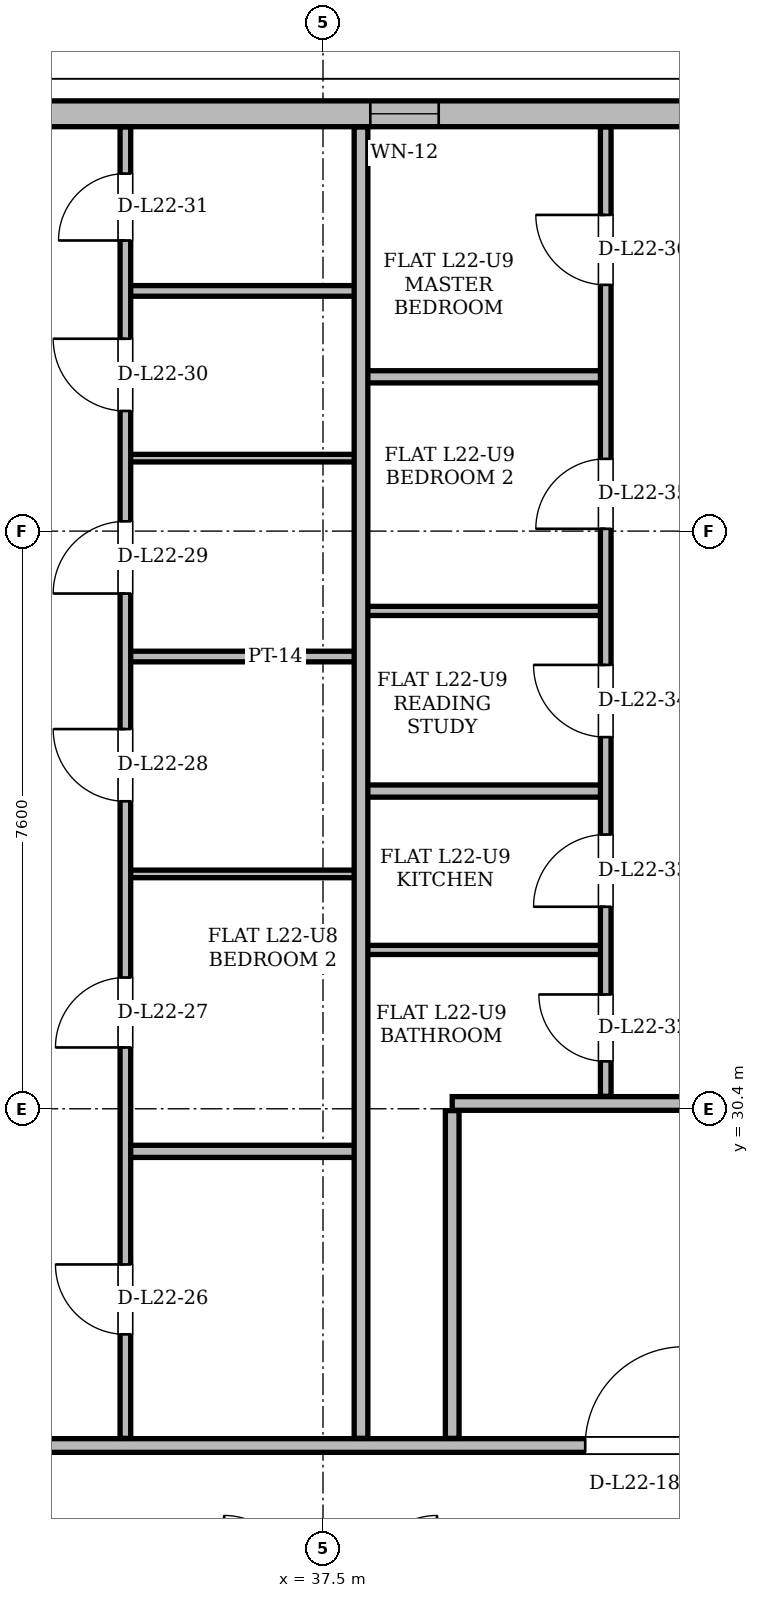
"""IFC4 building model, lengths in metres.
Left out: names, types, materials, properties, quantities, classifications, styles, units other than length and angle.
Written with IfcOpenShell. Run it as: python <this file> out.ifc"""

import sys

from ifc_helpers import new_model, si_unit, direction, frame, frame_2d, origin, place, context, subcontext, project, spatial, rectangle, extrude, element, fill, save


model = new_model("IFC4")
c1 = context("Model", 3, precision=1e-05, world=origin(), true_north=direction((0.0, 1.0)))
c2 = subcontext(c1, "Body", "Model", "MODEL_VIEW")
j1 = project(units=[si_unit("LENGTHUNIT", "METRE"), si_unit("PLANEANGLEUNIT", "RADIAN")], contexts=[c1])
p1 = place(None, origin())
s1 = spatial("IfcSite", under=j1, at=p1, CompositionType="ELEMENT")
p2 = place(p1, origin())
s2 = spatial("IfcBuilding", under=s1, at=p2, CompositionType="ELEMENT")
p3 = place(p2, frame((0.0, 0.0, 86.1)))
s3 = spatial("IfcBuildingStorey", under=s2, at=p3, CompositionType="ELEMENT", Elevation=86.1)
p4 = place(p3, frame((43.821, 43.49, 0.0), z_axis=(0.0, 0.0, 1.0), x_axis=(-1.0, 0.0, 0.0)))
e1 = element("IfcWall", 1, at=p4, inside=s3, PredefinedType="SOLIDWALL", context=c2, shape_type="SweptSolid", body=[
    extrude(rectangle(XDim=12.643, YDim=0.34, at=frame_2d((6.321, 0.0))), origin(), (0.0, 0.0, 1.0), 2.578),
])
p5 = place(p4, frame((4.799, 0.0, 0.85)))
e2 = element("IfcOpeningElement", 2, at=p5, cuts=e1, PredefinedType="OPENING", context=c2, shape_type="SweptSolid", body=[
    extrude(rectangle(XDim=0.9, YDim=1.15, at=frame_2d((0.45, 0.575))), frame((0.0, 0.17, 0.0), z_axis=(0.0, -1.0, 0.0), x_axis=(1.0, 0.0, 0.0)), (0.0, 0.0, 1.0), 0.34),
])
p6 = place(p3, frame((27.55, 25.97, 0.0), z_axis=(0.0, 0.0, 1.0), x_axis=(1.0, 0.0, 0.0)))
e3 = element("IfcWall", 3, at=p6, inside=s3, PredefinedType="PARTITIONING", context=c2, shape_type="SweptSolid", body=[
    extrude(rectangle(XDim=19.9, YDim=0.18, at=frame_2d((9.95, 0.0))), origin(), (0.0, 0.0, 1.0), 2.814),
])
p7 = place(p6, frame((0.425, 0.0, 0.0)))
e4 = element("IfcOpeningElement", 4, at=p7, cuts=e3, PredefinedType="OPENING", context=c2, shape_type="SweptSolid", body=[
    extrude(rectangle(XDim=1.0, YDim=2.18, at=frame_2d((0.5, 1.09))), frame((0.0, 0.09, 0.0), z_axis=(0.0, -1.0, 0.0), x_axis=(1.0, 0.0, 0.0)), (0.0, 0.0, 1.0), 0.18),
])
p8 = place(p6, frame((4.222, 0.0, 0.0)))
e5 = element("IfcOpeningElement", 5, at=p8, cuts=e3, PredefinedType="OPENING", context=c2, shape_type="SweptSolid", body=[
    extrude(rectangle(XDim=1.0, YDim=2.18, at=frame_2d((0.5, 1.09))), frame((0.0, 0.09, 0.0), z_axis=(0.0, -1.0, 0.0), x_axis=(1.0, 0.0, 0.0)), (0.0, 0.0, 1.0), 0.18),
])
p9 = place(p6, frame((13.4, 0.0, 0.0)))
e6 = element("IfcOpeningElement", 6, at=p9, cuts=e3, PredefinedType="OPENING", context=c2, shape_type="SweptSolid", body=[
    extrude(rectangle(XDim=1.3, YDim=2.2, at=frame_2d((0.65, 1.1))), frame((0.0, 0.09, 0.0), z_axis=(0.0, -1.0, 0.0), x_axis=(1.0, 0.0, 0.0)), (0.0, 0.0, 1.0), 0.18),
])
p10 = place(p6, frame((16.95, 0.0, 0.0)))
e7 = element("IfcOpeningElement", 7, at=p10, cuts=e3, PredefinedType="OPENING", context=c2, shape_type="SweptSolid", body=[
    extrude(rectangle(XDim=1.0, YDim=2.18, at=frame_2d((0.5, 1.09))), frame((0.0, 0.09, 0.0), z_axis=(0.0, -1.0, 0.0), x_axis=(1.0, 0.0, 0.0)), (0.0, 0.0, 1.0), 0.18),
])
p11 = place(p3, frame((34.9, 29.84, 0.0), z_axis=(0.0, 0.0, 1.0), x_axis=(1.0, 0.0, 0.0)))
e8 = element("IfcWall", 8, at=p11, inside=s3, PredefinedType="PARTITIONING", context=c2, shape_type="SweptSolid", body=[
    extrude(rectangle(XDim=3.15, YDim=0.16, at=frame_2d((1.575, 0.0))), origin(), (0.0, 0.0, 1.0), 3.36),
])
p12 = place(p3, frame((39.2, 30.47, 0.0), z_axis=(0.0, 0.0, 1.0), x_axis=(1.0, 0.0, 0.0)))
e9 = element("IfcWall", 9, at=p12, inside=s3, PredefinedType="PARTITIONING", context=c2, shape_type="SweptSolid", body=[
    extrude(rectangle(XDim=4.8, YDim=0.18, at=frame_2d((2.4, 0.0))), origin(), (0.0, 0.0, 1.0), 3.36),
])
p13 = place(p3, frame((37.95, 32.49, 0.0), z_axis=(0.0, 0.0, 1.0), x_axis=(1.0, 0.0, 0.0)))
e10 = element("IfcWall", 10, at=p13, inside=s3, PredefinedType="PARTITIONING", context=c2, shape_type="SweptSolid", body=[
    extrude(rectangle(XDim=3.27, YDim=0.12, at=frame_2d((1.635, 0.0))), origin(), (0.0, 0.0, 1.0), 3.36),
])
p14 = place(p3, frame((34.9, 33.49, 0.0), z_axis=(0.0, 0.0, 1.0), x_axis=(1.0, 0.0, 0.0)))
e11 = element("IfcWall", 11, at=p14, inside=s3, PredefinedType="PARTITIONING", context=c2, shape_type="SweptSolid", body=[
    extrude(rectangle(XDim=3.15, YDim=0.1, at=frame_2d((1.575, 0.0))), origin(), (0.0, 0.0, 1.0), 3.36),
])
p15 = place(p3, frame((37.95, 34.58, 0.0), z_axis=(0.0, 0.0, 1.0), x_axis=(1.0, 0.0, 0.0)))
e12 = element("IfcWall", 12, at=p15, inside=s3, PredefinedType="PARTITIONING", context=c2, shape_type="SweptSolid", body=[
    extrude(rectangle(XDim=3.27, YDim=0.16, at=frame_2d((1.635, 0.0))), origin(), (0.0, 0.0, 1.0), 3.36),
])
p16 = place(p3, frame((34.9, 36.35, 0.0), z_axis=(0.0, 0.0, 1.0), x_axis=(1.0, 0.0, 0.0)))
e13 = element("IfcWall", 13, at=p16, inside=s3, PredefinedType="PARTITIONING", context=c2, shape_type="SweptSolid", body=[
    extrude(rectangle(XDim=3.15, YDim=0.14, at=frame_2d((1.575, 0.0))), origin(), (0.0, 0.0, 1.0), 3.36),
])
p17 = place(p3, frame((37.95, 36.95, 0.0), z_axis=(0.0, 0.0, 1.0), x_axis=(1.0, 0.0, 0.0)))
e14 = element("IfcWall", 14, at=p17, inside=s3, PredefinedType="PARTITIONING", context=c2, shape_type="SweptSolid", body=[
    extrude(rectangle(XDim=3.27, YDim=0.12, at=frame_2d((1.635, 0.0))), origin(), (0.0, 0.0, 1.0), 3.36),
])
p18 = place(p3, frame((34.9, 38.96, 0.0), z_axis=(0.0, 0.0, 1.0), x_axis=(1.0, 0.0, 0.0)))
e15 = element("IfcWall", 15, at=p18, inside=s3, PredefinedType="PARTITIONING", context=c2, shape_type="SweptSolid", body=[
    extrude(rectangle(XDim=3.15, YDim=0.1, at=frame_2d((1.575, 0.0))), origin(), (0.0, 0.0, 1.0), 3.36),
])
p19 = place(p3, frame((37.95, 40.03, 0.0), z_axis=(0.0, 0.0, 1.0), x_axis=(1.0, 0.0, 0.0)))
e16 = element("IfcWall", 16, at=p19, inside=s3, PredefinedType="PARTITIONING", context=c2, shape_type="SweptSolid", body=[
    extrude(rectangle(XDim=3.27, YDim=0.16, at=frame_2d((1.635, 0.0))), origin(), (0.0, 0.0, 1.0), 3.36),
])
p20 = place(p3, frame((34.9, 41.16, 0.0), z_axis=(0.0, 0.0, 1.0), x_axis=(1.0, 0.0, 0.0)))
e17 = element("IfcWall", 17, at=p20, inside=s3, PredefinedType="PARTITIONING", context=c2, shape_type="SweptSolid", body=[
    extrude(rectangle(XDim=3.15, YDim=0.14, at=frame_2d((1.575, 0.0))), origin(), (0.0, 0.0, 1.0), 3.36),
])
p21 = place(p3, frame((34.9, 26.064, 0.0), z_axis=(0.0, 0.0, 1.0), x_axis=(0.0, 1.0, 0.0)))
e18 = element("IfcWall", 18, at=p21, inside=s3, PredefinedType="PARTITIONING", context=c2, shape_type="SweptSolid", body=[
    extrude(rectangle(XDim=17.252, YDim=0.14, at=frame_2d((8.626, 0.0))), origin(), (0.0, 0.0, 1.0), 3.36),
])
p22 = place(p21, frame((1.368, 0.0, 0.0)))
e19 = element("IfcOpeningElement", 19, at=p22, cuts=e18, PredefinedType="OPENING", context=c2, shape_type="SweptSolid", body=[
    extrude(rectangle(XDim=0.92, YDim=2.12, at=frame_2d((0.46, 1.06))), frame((0.0, 0.07, 0.0), z_axis=(0.0, -1.0, 0.0), x_axis=(1.0, 0.0, 0.0)), (0.0, 0.0, 1.0), 0.14),
])
p23 = place(p21, frame((5.143, 0.0, 0.0)))
e20 = element("IfcOpeningElement", 20, at=p23, cuts=e18, PredefinedType="OPENING", context=c2, shape_type="SweptSolid", body=[
    extrude(rectangle(XDim=0.92, YDim=2.12, at=frame_2d((0.46, 1.06))), frame((0.0, 0.07, 0.0), z_axis=(0.0, -1.0, 0.0), x_axis=(1.0, 0.0, 0.0)), (0.0, 0.0, 1.0), 0.14),
])
p24 = place(p21, frame((8.382, 0.0, 0.0)))
e21 = element("IfcOpeningElement", 21, at=p24, cuts=e18, PredefinedType="OPENING", context=c2, shape_type="SweptSolid", body=[
    extrude(rectangle(XDim=0.95, YDim=2.1, at=frame_2d((0.475, 1.05))), frame((0.0, 0.07, 0.0), z_axis=(0.0, -1.0, 0.0), x_axis=(1.0, 0.0, 0.0)), (0.0, 0.0, 1.0), 0.14),
])
p25 = place(p21, frame((11.115, 0.0, 0.0)))
e22 = element("IfcOpeningElement", 22, at=p25, cuts=e18, PredefinedType="OPENING", context=c2, shape_type="SweptSolid", body=[
    extrude(rectangle(XDim=0.95, YDim=2.1, at=frame_2d((0.475, 1.05))), frame((0.0, 0.07, 0.0), z_axis=(0.0, -1.0, 0.0), x_axis=(1.0, 0.0, 0.0)), (0.0, 0.0, 1.0), 0.14),
])
p26 = place(p21, frame((13.517, 0.0, 0.0)))
e23 = element("IfcOpeningElement", 23, at=p26, cuts=e18, PredefinedType="OPENING", context=c2, shape_type="SweptSolid", body=[
    extrude(rectangle(XDim=0.95, YDim=2.1, at=frame_2d((0.475, 1.05))), frame((0.0, 0.07, 0.0), z_axis=(0.0, -1.0, 0.0), x_axis=(1.0, 0.0, 0.0)), (0.0, 0.0, 1.0), 0.14),
])
p27 = place(p21, frame((15.76, 0.0, 0.0)))
e24 = element("IfcOpeningElement", 24, at=p27, cuts=e18, PredefinedType="OPENING", context=c2, shape_type="SweptSolid", body=[
    extrude(rectangle(XDim=0.88, YDim=2.08, at=frame_2d((0.44, 1.04))), frame((0.0, 0.07, 0.0), z_axis=(0.0, -1.0, 0.0), x_axis=(1.0, 0.0, 0.0)), (0.0, 0.0, 1.0), 0.14),
])
p28 = place(p3, frame((38.0, 26.064, 0.0), z_axis=(0.0, 0.0, 1.0), x_axis=(0.0, 1.0, 0.0)))
e25 = element("IfcWall", 25, at=p28, inside=s3, PredefinedType="PARTITIONING", context=c2, shape_type="SweptSolid", body=[
    extrude(rectangle(XDim=17.252, YDim=0.18, at=frame_2d((8.626, 0.0))), origin(), (0.0, 0.0, 1.0), 3.36),
])
p29 = place(p3, frame((39.2, 26.064, 0.0), z_axis=(0.0, 0.0, 1.0), x_axis=(0.0, 1.0, 0.0)))
e26 = element("IfcWall", 26, at=p29, inside=s3, PredefinedType="PARTITIONING", context=c2, shape_type="SweptSolid", body=[
    extrude(rectangle(XDim=4.312, YDim=0.18, at=frame_2d((2.156, 0.0))), origin(), (0.0, 0.0, 1.0), 3.36),
])
p30 = place(p3, frame((41.22, 30.564, 0.0), z_axis=(0.0, 0.0, 1.0), x_axis=(0.0, 1.0, 0.0)))
e27 = element("IfcWall", 27, at=p30, inside=s3, PredefinedType="PARTITIONING", context=c2, shape_type="SweptSolid", body=[
    extrude(rectangle(XDim=12.752, YDim=0.14, at=frame_2d((6.376, 0.0))), origin(), (0.0, 0.0, 1.0), 3.36),
])
p31 = place(p30, frame((0.46, 0.0, 0.0)))
e28 = element("IfcOpeningElement", 28, at=p31, cuts=e27, PredefinedType="OPENING", context=c2, shape_type="SweptSolid", body=[
    extrude(rectangle(XDim=0.88, YDim=2.08, at=frame_2d((0.44, 1.04))), frame((0.0, 0.07, 0.0), z_axis=(0.0, -1.0, 0.0), x_axis=(1.0, 0.0, 0.0)), (0.0, 0.0, 1.0), 0.14),
])
p32 = place(p30, frame((2.494, 0.0, 0.0)))
e29 = element("IfcOpeningElement", 29, at=p32, cuts=e27, PredefinedType="OPENING", context=c2, shape_type="SweptSolid", body=[
    extrude(rectangle(XDim=0.95, YDim=2.1, at=frame_2d((0.475, 1.05))), frame((0.0, 0.07, 0.0), z_axis=(0.0, -1.0, 0.0), x_axis=(1.0, 0.0, 0.0)), (0.0, 0.0, 1.0), 0.14),
])
p33 = place(p30, frame((4.726, 0.0, 0.0)))
e30 = element("IfcOpeningElement", 30, at=p33, cuts=e27, PredefinedType="OPENING", context=c2, shape_type="SweptSolid", body=[
    extrude(rectangle(XDim=0.95, YDim=2.1, at=frame_2d((0.475, 1.05))), frame((0.0, 0.07, 0.0), z_axis=(0.0, -1.0, 0.0), x_axis=(1.0, 0.0, 0.0)), (0.0, 0.0, 1.0), 0.14),
])
p34 = place(p30, frame((7.467, 0.0, 0.0)))
e31 = element("IfcOpeningElement", 31, at=p34, cuts=e27, PredefinedType="OPENING", context=c2, shape_type="SweptSolid", body=[
    extrude(rectangle(XDim=0.92, YDim=2.12, at=frame_2d((0.46, 1.06))), frame((0.0, 0.07, 0.0), z_axis=(0.0, -1.0, 0.0), x_axis=(1.0, 0.0, 0.0)), (0.0, 0.0, 1.0), 0.14),
])
p35 = place(p30, frame((10.676, 0.0, 0.0)))
e32 = element("IfcOpeningElement", 32, at=p35, cuts=e27, PredefinedType="OPENING", context=c2, shape_type="SweptSolid", body=[
    extrude(rectangle(XDim=0.92, YDim=2.12, at=frame_2d((0.46, 1.06))), frame((0.0, 0.07, 0.0), z_axis=(0.0, -1.0, 0.0), x_axis=(1.0, 0.0, 0.0)), (0.0, 0.0, 1.0), 0.14),
])
p36 = place(p5, origin())
e33 = element("IfcWindow", 33, at=p36, inside=s3, PartitioningType="SINGLE_PANEL", PredefinedType="WINDOW", context=c2, shape_type="SweptSolid", body=[
    extrude(rectangle(XDim=0.9, YDim=1.15, at=frame_2d((0.45, 0.575))), frame((0.0, 0.03, 0.0), z_axis=(0.0, -1.0, 0.0), x_axis=(1.0, 0.0, 0.0)), (0.0, 0.0, 1.0), 0.06),
])
fill(e2, e33)
p37 = place(p9, origin())
e34 = element("IfcDoor", 34, at=p37, inside=s3, OperationType="SINGLE_SWING_RIGHT", PredefinedType="DOOR", context=c2, shape_type="SweptSolid", body=[
    extrude(rectangle(XDim=1.3, YDim=2.2, at=frame_2d((0.65, 1.1))), frame((0.0, 0.025, 0.0), z_axis=(0.0, -1.0, 0.0), x_axis=(1.0, 0.0, 0.0)), (0.0, 0.0, 1.0), 0.05),
])
fill(e6, e34)
p38 = place(p22, origin())
e35 = element("IfcDoor", 35, at=p38, inside=s3, OperationType="SINGLE_SWING_RIGHT", PredefinedType="DOOR", context=c2, shape_type="SweptSolid", body=[
    extrude(rectangle(XDim=0.92, YDim=2.12, at=frame_2d((0.46, 1.06))), frame((0.0, 0.025, 0.0), z_axis=(0.0, -1.0, 0.0), x_axis=(1.0, 0.0, 0.0)), (0.0, 0.0, 1.0), 0.05),
])
fill(e19, e35)
p39 = place(p23, origin())
e36 = element("IfcDoor", 36, at=p39, inside=s3, OperationType="SINGLE_SWING_LEFT", PredefinedType="DOOR", context=c2, shape_type="SweptSolid", body=[
    extrude(rectangle(XDim=0.92, YDim=2.12, at=frame_2d((0.46, 1.06))), frame((0.0, 0.025, 0.0), z_axis=(0.0, -1.0, 0.0), x_axis=(1.0, 0.0, 0.0)), (0.0, 0.0, 1.0), 0.05),
])
fill(e20, e36)
p40 = place(p24, origin())
e37 = element("IfcDoor", 37, at=p40, inside=s3, OperationType="SINGLE_SWING_RIGHT", PredefinedType="DOOR", context=c2, shape_type="SweptSolid", body=[
    extrude(rectangle(XDim=0.95, YDim=2.1, at=frame_2d((0.475, 1.05))), frame((0.0, 0.025, 0.0), z_axis=(0.0, -1.0, 0.0), x_axis=(1.0, 0.0, 0.0)), (0.0, 0.0, 1.0), 0.05),
])
fill(e21, e37)
p41 = place(p25, origin())
e38 = element("IfcDoor", 38, at=p41, inside=s3, OperationType="SINGLE_SWING_LEFT", PredefinedType="DOOR", context=c2, shape_type="SweptSolid", body=[
    extrude(rectangle(XDim=0.95, YDim=2.1, at=frame_2d((0.475, 1.05))), frame((0.0, 0.025, 0.0), z_axis=(0.0, -1.0, 0.0), x_axis=(1.0, 0.0, 0.0)), (0.0, 0.0, 1.0), 0.05),
])
fill(e22, e38)
p42 = place(p26, origin())
e39 = element("IfcDoor", 39, at=p42, inside=s3, OperationType="SINGLE_SWING_RIGHT", PredefinedType="DOOR", context=c2, shape_type="SweptSolid", body=[
    extrude(rectangle(XDim=0.95, YDim=2.1, at=frame_2d((0.475, 1.05))), frame((0.0, 0.025, 0.0), z_axis=(0.0, -1.0, 0.0), x_axis=(1.0, 0.0, 0.0)), (0.0, 0.0, 1.0), 0.05),
])
fill(e23, e39)
p43 = place(p27, origin())
e40 = element("IfcDoor", 40, at=p43, inside=s3, OperationType="SINGLE_SWING_LEFT", PredefinedType="DOOR", context=c2, shape_type="SweptSolid", body=[
    extrude(rectangle(XDim=0.88, YDim=2.08, at=frame_2d((0.44, 1.04))), frame((0.0, 0.025, 0.0), z_axis=(0.0, -1.0, 0.0), x_axis=(1.0, 0.0, 0.0)), (0.0, 0.0, 1.0), 0.05),
])
fill(e24, e40)
p44 = place(p31, origin())
e41 = element("IfcDoor", 41, at=p44, inside=s3, OperationType="SINGLE_SWING_RIGHT", PredefinedType="DOOR", context=c2, shape_type="SweptSolid", body=[
    extrude(rectangle(XDim=0.88, YDim=2.08, at=frame_2d((0.44, 1.04))), frame((0.0, 0.025, 0.0), z_axis=(0.0, -1.0, 0.0), x_axis=(1.0, 0.0, 0.0)), (0.0, 0.0, 1.0), 0.05),
])
fill(e28, e41)
p45 = place(p32, origin())
e42 = element("IfcDoor", 42, at=p45, inside=s3, OperationType="SINGLE_SWING_LEFT", PredefinedType="DOOR", context=c2, shape_type="SweptSolid", body=[
    extrude(rectangle(XDim=0.95, YDim=2.1, at=frame_2d((0.475, 1.05))), frame((0.0, 0.025, 0.0), z_axis=(0.0, -1.0, 0.0), x_axis=(1.0, 0.0, 0.0)), (0.0, 0.0, 1.0), 0.05),
])
fill(e29, e42)
p46 = place(p33, origin())
e43 = element("IfcDoor", 43, at=p46, inside=s3, OperationType="SINGLE_SWING_RIGHT", PredefinedType="DOOR", context=c2, shape_type="SweptSolid", body=[
    extrude(rectangle(XDim=0.95, YDim=2.1, at=frame_2d((0.475, 1.05))), frame((0.0, 0.025, 0.0), z_axis=(0.0, -1.0, 0.0), x_axis=(1.0, 0.0, 0.0)), (0.0, 0.0, 1.0), 0.05),
])
fill(e30, e43)
p47 = place(p34, origin())
e44 = element("IfcDoor", 44, at=p47, inside=s3, OperationType="SINGLE_SWING_LEFT", PredefinedType="DOOR", context=c2, shape_type="SweptSolid", body=[
    extrude(rectangle(XDim=0.92, YDim=2.12, at=frame_2d((0.46, 1.06))), frame((0.0, 0.025, 0.0), z_axis=(0.0, -1.0, 0.0), x_axis=(1.0, 0.0, 0.0)), (0.0, 0.0, 1.0), 0.05),
])
fill(e31, e44)
p48 = place(p35, origin())
e45 = element("IfcDoor", 45, at=p48, inside=s3, OperationType="SINGLE_SWING_RIGHT", PredefinedType="DOOR", context=c2, shape_type="SweptSolid", body=[
    extrude(rectangle(XDim=0.92, YDim=2.12, at=frame_2d((0.46, 1.06))), frame((0.0, 0.025, 0.0), z_axis=(0.0, -1.0, 0.0), x_axis=(1.0, 0.0, 0.0)), (0.0, 0.0, 1.0), 0.05),
])
fill(e32, e45)
save(model, sys.argv[1])
